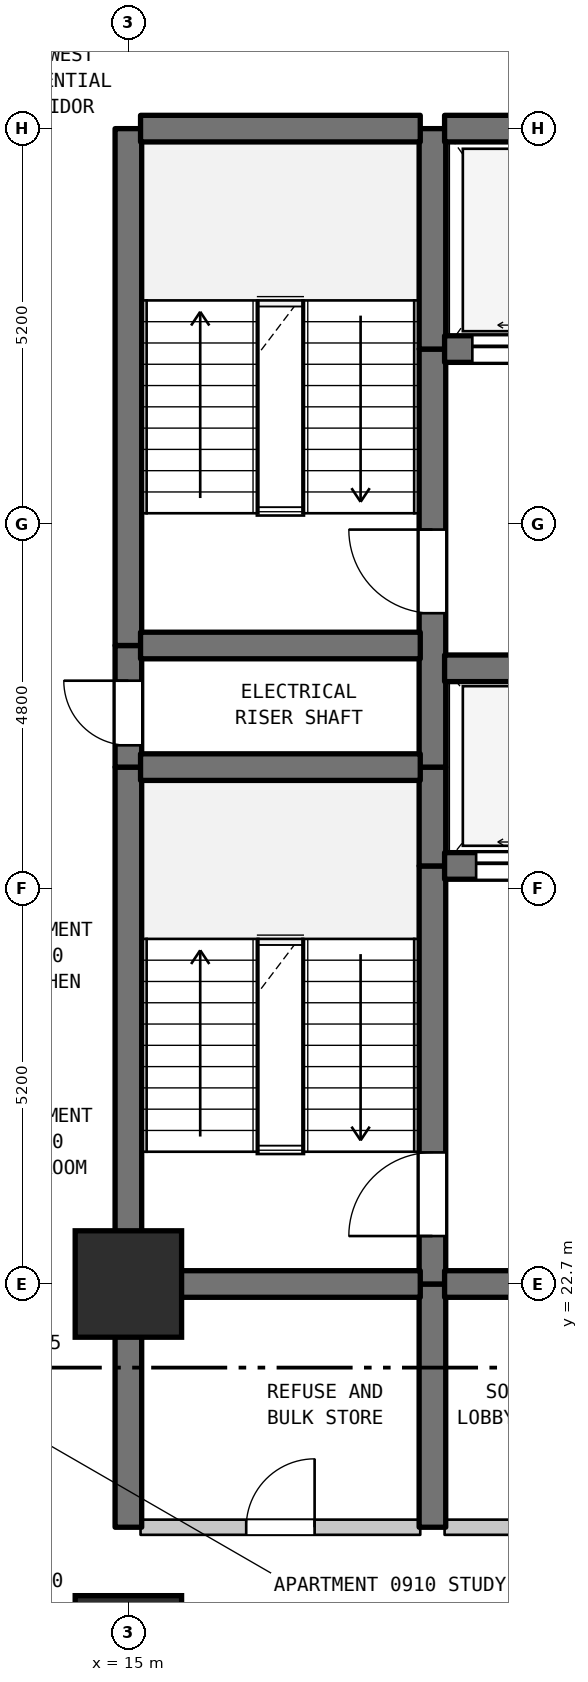
"""IFC4 building model, lengths in metres.
Left out: names, types, materials, properties, quantities, classifications, styles, units other than length and angle.
Written with IfcOpenShell. Run it as: python <this file> out.ifc"""

import sys

from ifc_helpers import new_model, si_unit, direction, frame, frame_2d, origin, origin_2d, place, context, subcontext, project, spatial, rectangle, extrude, element, fill, save


model = new_model("IFC4")
c1 = context("Model", 3, precision=1e-05, world=origin(), true_north=direction((0.0, 1.0)))
c2 = subcontext(c1, "Body", "Model", "MODEL_VIEW")
j1 = project(units=[si_unit("LENGTHUNIT", "METRE"), si_unit("PLANEANGLEUNIT", "RADIAN")], contexts=[c1])
p1 = place(None, origin())
s1 = spatial("IfcSite", under=j1, at=p1, CompositionType="ELEMENT")
p2 = place(p1, origin())
s2 = spatial("IfcBuilding", under=s1, at=p2, CompositionType="ELEMENT")
p3 = place(p2, frame((0.0, 0.0, 42.5)))
s3 = spatial("IfcBuildingStorey", under=s2, at=p3, CompositionType="ELEMENT", Elevation=42.5)
for number, where, z_axis, x_axis in (
    (1, (15.0, 17.9, 0.0), (0.0, 0.0, 1.0), (1.0, 0.0, 0.0)),
    (2, (15.0, 22.7, 0.0), (0.0, 0.0, 1.0), (1.0, 0.0, 0.0)),
):
    element("IfcColumn", number, at=place(p3, frame(where, z_axis=z_axis, x_axis=x_axis)), inside=s3, PredefinedType="COLUMN", context=c2, shape_type="SweptSolid", body=[
        extrude(rectangle(XDim=1.4, YDim=1.4, at=origin_2d()), origin(), (0.0, 0.0, 1.0), 3.7),
    ])
p4 = place(p3, frame((15.0, 19.5, 0.0), z_axis=(0.0, 0.0, 1.0), x_axis=(0.0, 1.0, 0.0)))
e3 = element("IfcWall", 3, at=p4, inside=s3, PredefinedType="SHEAR", context=c2, shape_type="SweptSolid", body=[
    extrude(rectangle(XDim=3.2, YDim=0.35, at=frame_2d((1.6, 0.0))), origin(), (0.0, 0.0, 1.0), 3.385),
])
p5 = place(p3, frame((15.0, 22.7, 0.0), z_axis=(0.0, 0.0, 1.0), x_axis=(0.0, 1.0, 0.0)))
e4 = element("IfcWall", 4, at=p5, inside=s3, PredefinedType="SHEAR", context=c2, shape_type="SweptSolid", body=[
    extrude(rectangle(XDim=6.8, YDim=0.35, at=frame_2d((3.4, 0.0))), origin(), (0.0, 0.0, 1.0), 3.385),
])
p6 = place(p3, frame((15.0, 29.5, 0.0), z_axis=(0.0, 0.0, 1.0), x_axis=(0.0, 1.0, 0.0)))
e5 = element("IfcWall", 5, at=p6, inside=s3, PredefinedType="SHEAR", context=c2, shape_type="SweptSolid", body=[
    extrude(rectangle(XDim=1.6, YDim=0.35, at=frame_2d((0.8, 0.0))), origin(), (0.0, 0.0, 1.0), 3.385),
])
p7 = place(p6, frame((0.287, 0.0, 0.0)))
e6 = element("IfcOpeningElement", 6, at=p7, cuts=e5, PredefinedType="OPENING", context=c2, shape_type="SweptSolid", body=[
    extrude(rectangle(XDim=0.85, YDim=2.1, at=frame_2d((0.425, 1.05))), frame((0.0, 0.185, 0.0), z_axis=(0.0, -1.0, 0.0), x_axis=(1.0, 0.0, 0.0)), (0.0, 0.0, 1.0), 0.37),
])
p8 = place(p3, frame((15.0, 31.1, 0.0), z_axis=(0.0, 0.0, 1.0), x_axis=(0.0, 1.0, 0.0)))
e7 = element("IfcWall", 7, at=p8, inside=s3, PredefinedType="SHEAR", context=c2, shape_type="SweptSolid", body=[
    extrude(rectangle(XDim=6.8, YDim=0.35, at=frame_2d((3.4, 0.0))), origin(), (0.0, 0.0, 1.0), 3.385),
])
p9 = place(p3, frame((19.0, 19.5, 0.0), z_axis=(0.0, 0.0, 1.0), x_axis=(0.0, 1.0, 0.0)))
e8 = element("IfcWall", 8, at=p9, inside=s3, PredefinedType="SHEAR", context=c2, shape_type="SweptSolid", body=[
    extrude(rectangle(XDim=3.2, YDim=0.35, at=frame_2d((1.6, 0.0))), origin(), (0.0, 0.0, 1.0), 3.385),
])
p10 = place(p3, frame((19.0, 22.7, 0.0), z_axis=(0.0, 0.0, 1.0), x_axis=(0.0, 1.0, 0.0)))
e9 = element("IfcWall", 9, at=p10, inside=s3, PredefinedType="SHEAR", context=c2, shape_type="SweptSolid", body=[
    extrude(rectangle(XDim=5.5, YDim=0.35, at=frame_2d((2.75, 0.0))), origin(), (0.0, 0.0, 1.0), 3.385),
])
p11 = place(p10, frame((0.631, 0.0, 0.0)))
e10 = element("IfcOpeningElement", 10, at=p11, cuts=e9, PredefinedType="OPENING", context=c2, shape_type="SweptSolid", body=[
    extrude(rectangle(XDim=1.1, YDim=2.15, at=frame_2d((0.55, 1.075))), frame((0.0, 0.185, 0.0), z_axis=(0.0, -1.0, 0.0), x_axis=(1.0, 0.0, 0.0)), (0.0, 0.0, 1.0), 0.37),
])
p12 = place(p3, frame((19.0, 28.2, 0.0), z_axis=(0.0, 0.0, 1.0), x_axis=(0.0, 1.0, 0.0)))
e11 = element("IfcWall", 11, at=p12, inside=s3, PredefinedType="SHEAR", context=c2, shape_type="SweptSolid", body=[
    extrude(rectangle(XDim=1.3, YDim=0.35, at=frame_2d((0.65, 0.0))), origin(), (0.0, 0.0, 1.0), 3.385),
])
p13 = place(p3, frame((19.0, 29.5, 0.0), z_axis=(0.0, 0.0, 1.0), x_axis=(0.0, 1.0, 0.0)))
e12 = element("IfcWall", 12, at=p13, inside=s3, PredefinedType="SHEAR", context=c2, shape_type="SweptSolid", body=[
    extrude(rectangle(XDim=5.5, YDim=0.35, at=frame_2d((2.75, 0.0))), origin(), (0.0, 0.0, 1.0), 3.385),
])
p14 = place(p13, frame((2.025, 0.0, 0.0)))
e13 = element("IfcOpeningElement", 13, at=p14, cuts=e12, PredefinedType="OPENING", context=c2, shape_type="SweptSolid", body=[
    extrude(rectangle(XDim=1.1, YDim=2.15, at=frame_2d((0.55, 1.075))), frame((0.0, 0.185, 0.0), z_axis=(0.0, -1.0, 0.0), x_axis=(1.0, 0.0, 0.0)), (0.0, 0.0, 1.0), 0.37),
])
p15 = place(p3, frame((19.0, 35.0, 0.0), z_axis=(0.0, 0.0, 1.0), x_axis=(0.0, 1.0, 0.0)))
e14 = element("IfcWall", 14, at=p15, inside=s3, PredefinedType="SHEAR", context=c2, shape_type="SweptSolid", body=[
    extrude(rectangle(XDim=2.9, YDim=0.35, at=frame_2d((1.45, 0.0))), origin(), (0.0, 0.0, 1.0), 3.385),
])
p16 = place(p3, frame((15.16, 19.5, 0.0), z_axis=(0.0, 0.0, 1.0), x_axis=(1.0, 0.0, 0.0)))
e15 = element("IfcWall", 15, at=p16, inside=s3, PredefinedType="STANDARD", context=c2, shape_type="SweptSolid", body=[
    extrude(rectangle(XDim=3.68, YDim=0.2, at=frame_2d((1.84, 0.0))), origin(), (0.0, 0.0, 1.0), 3.385),
])
p17 = place(p16, frame((1.39, 0.0, 0.0)))
e16 = element("IfcOpeningElement", 16, at=p17, cuts=e15, PredefinedType="OPENING", context=c2, shape_type="SweptSolid", body=[
    extrude(rectangle(XDim=0.9, YDim=2.15, at=frame_2d((0.45, 1.075))), frame((0.0, 0.11, 0.0), z_axis=(0.0, -1.0, 0.0), x_axis=(1.0, 0.0, 0.0)), (0.0, 0.0, 1.0), 0.22),
])
p18 = place(p3, frame((19.16, 19.5, 0.0), z_axis=(0.0, 0.0, 1.0), x_axis=(1.0, 0.0, 0.0)))
e17 = element("IfcWall", 17, at=p18, inside=s3, PredefinedType="STANDARD", context=c2, shape_type="SweptSolid", body=[
    extrude(rectangle(XDim=4.48, YDim=0.2, at=frame_2d((2.24, 0.0))), origin(), (0.0, 0.0, 1.0), 3.385),
])
p19 = place(p18, frame((1.64, 0.0, 0.0)))
e18 = element("IfcOpeningElement", 18, at=p19, cuts=e17, PredefinedType="OPENING", context=c2, shape_type="SweptSolid", body=[
    extrude(rectangle(XDim=1.2, YDim=2.2, at=frame_2d((0.6, 1.1))), frame((0.0, 0.11, 0.0), z_axis=(0.0, -1.0, 0.0), x_axis=(1.0, 0.0, 0.0)), (0.0, 0.0, 1.0), 0.22),
])
p20 = place(p3, frame((15.16, 22.7, 0.0), z_axis=(0.0, 0.0, 1.0), x_axis=(1.0, 0.0, 0.0)))
e19 = element("IfcWall", 19, at=p20, inside=s3, PredefinedType="SHEAR", context=c2, shape_type="SweptSolid", body=[
    extrude(rectangle(XDim=3.68, YDim=0.35, at=frame_2d((1.84, 0.0))), origin(), (0.0, 0.0, 1.0), 3.385),
])
p21 = place(p3, frame((19.16, 22.7, 0.0), z_axis=(0.0, 0.0, 1.0), x_axis=(1.0, 0.0, 0.0)))
e20 = element("IfcWall", 20, at=p21, inside=s3, PredefinedType="SHEAR", context=c2, shape_type="SweptSolid", body=[
    extrude(rectangle(XDim=4.48, YDim=0.35, at=frame_2d((2.24, 0.0))), origin(), (0.0, 0.0, 1.0), 3.385),
])
p22 = place(p21, frame((1.64, 0.0, 0.0)))
e21 = element("IfcOpeningElement", 21, at=p22, cuts=e20, PredefinedType="OPENING", context=c2, shape_type="SweptSolid", body=[
    extrude(rectangle(XDim=1.2, YDim=2.2, at=frame_2d((0.6, 1.1))), frame((0.0, 0.185, 0.0), z_axis=(0.0, -1.0, 0.0), x_axis=(1.0, 0.0, 0.0)), (0.0, 0.0, 1.0), 0.37),
])
p23 = place(p3, frame((19.16, 28.2, 0.0), z_axis=(0.0, 0.0, 1.0), x_axis=(1.0, 0.0, 0.0)))
e22 = element("IfcWall", 22, at=p23, inside=s3, PredefinedType="SHEAR", context=c2, shape_type="SweptSolid", body=[
    extrude(rectangle(XDim=4.48, YDim=0.35, at=frame_2d((2.24, 0.0))), origin(), (0.0, 0.0, 1.0), 3.385),
])
p24 = place(p23, frame((0.415, 0.0, 0.0)))
e23 = element("IfcOpeningElement", 23, at=p24, cuts=e22, PredefinedType="OPENING", context=c2, shape_type="SweptSolid", body=[
    extrude(rectangle(XDim=1.25, YDim=2.2, at=frame_2d((0.625, 1.1))), frame((0.0, 0.185, 0.0), z_axis=(0.0, -1.0, 0.0), x_axis=(1.0, 0.0, 0.0)), (0.0, 0.0, 1.0), 0.37),
])
p25 = place(p23, frame((2.815, 0.0, 0.0)))
e24 = element("IfcOpeningElement", 24, at=p25, cuts=e22, PredefinedType="OPENING", context=c2, shape_type="SweptSolid", body=[
    extrude(rectangle(XDim=1.25, YDim=2.2, at=frame_2d((0.625, 1.1))), frame((0.0, 0.185, 0.0), z_axis=(0.0, -1.0, 0.0), x_axis=(1.0, 0.0, 0.0)), (0.0, 0.0, 1.0), 0.37),
])
p26 = place(p3, frame((15.16, 29.5, 0.0), z_axis=(0.0, 0.0, 1.0), x_axis=(1.0, 0.0, 0.0)))
e25 = element("IfcWall", 25, at=p26, inside=s3, PredefinedType="SHEAR", context=c2, shape_type="SweptSolid", body=[
    extrude(rectangle(XDim=3.68, YDim=0.35, at=frame_2d((1.84, 0.0))), origin(), (0.0, 0.0, 1.0), 3.385),
])
p27 = place(p3, frame((19.16, 30.8, 0.0), z_axis=(0.0, 0.0, 1.0), x_axis=(1.0, 0.0, 0.0)))
e26 = element("IfcWall", 26, at=p27, inside=s3, PredefinedType="SHEAR", context=c2, shape_type="SweptSolid", body=[
    extrude(rectangle(XDim=4.48, YDim=0.35, at=frame_2d((2.24, 0.0))), origin(), (0.0, 0.0, 1.0), 3.385),
])
p28 = place(p3, frame((15.16, 31.1, 0.0), z_axis=(0.0, 0.0, 1.0), x_axis=(1.0, 0.0, 0.0)))
e27 = element("IfcWall", 27, at=p28, inside=s3, PredefinedType="SHEAR", context=c2, shape_type="SweptSolid", body=[
    extrude(rectangle(XDim=3.68, YDim=0.35, at=frame_2d((1.84, 0.0))), origin(), (0.0, 0.0, 1.0), 3.385),
])
p29 = place(p3, frame((19.16, 35.0, 0.0), z_axis=(0.0, 0.0, 1.0), x_axis=(1.0, 0.0, 0.0)))
e28 = element("IfcWall", 28, at=p29, inside=s3, PredefinedType="SHEAR", context=c2, shape_type="SweptSolid", body=[
    extrude(rectangle(XDim=11.48, YDim=0.35, at=frame_2d((5.74, 0.0))), origin(), (0.0, 0.0, 1.0), 3.385),
])
p30 = place(p29, frame((0.365, 0.0, 0.0)))
e29 = element("IfcOpeningElement", 29, at=p30, cuts=e28, PredefinedType="OPENING", context=c2, shape_type="SweptSolid", body=[
    extrude(rectangle(XDim=1.35, YDim=2.2, at=frame_2d((0.675, 1.1))), frame((0.0, 0.185, 0.0), z_axis=(0.0, -1.0, 0.0), x_axis=(1.0, 0.0, 0.0)), (0.0, 0.0, 1.0), 0.37),
])
p31 = place(p29, frame((2.765, 0.0, 0.0)))
e30 = element("IfcOpeningElement", 30, at=p31, cuts=e28, PredefinedType="OPENING", context=c2, shape_type="SweptSolid", body=[
    extrude(rectangle(XDim=1.35, YDim=2.2, at=frame_2d((0.675, 1.1))), frame((0.0, 0.185, 0.0), z_axis=(0.0, -1.0, 0.0), x_axis=(1.0, 0.0, 0.0)), (0.0, 0.0, 1.0), 0.37),
])
p32 = place(p29, frame((4.915, 0.0, 0.0)))
e31 = element("IfcOpeningElement", 31, at=p32, cuts=e28, PredefinedType="OPENING", context=c2, shape_type="SweptSolid", body=[
    extrude(rectangle(XDim=1.2, YDim=2.2, at=frame_2d((0.6, 1.1))), frame((0.0, 0.185, 0.0), z_axis=(0.0, -1.0, 0.0), x_axis=(1.0, 0.0, 0.0)), (0.0, 0.0, 1.0), 0.37),
])
p33 = place(p29, frame((6.665, 0.0, 0.0)))
e32 = element("IfcOpeningElement", 32, at=p33, cuts=e28, PredefinedType="OPENING", context=c2, shape_type="SweptSolid", body=[
    extrude(rectangle(XDim=1.2, YDim=2.2, at=frame_2d((0.6, 1.1))), frame((0.0, 0.185, 0.0), z_axis=(0.0, -1.0, 0.0), x_axis=(1.0, 0.0, 0.0)), (0.0, 0.0, 1.0), 0.37),
])
p34 = place(p29, frame((8.415, 0.0, 0.0)))
e33 = element("IfcOpeningElement", 33, at=p34, cuts=e28, PredefinedType="OPENING", context=c2, shape_type="SweptSolid", body=[
    extrude(rectangle(XDim=1.2, YDim=2.2, at=frame_2d((0.6, 1.1))), frame((0.0, 0.185, 0.0), z_axis=(0.0, -1.0, 0.0), x_axis=(1.0, 0.0, 0.0)), (0.0, 0.0, 1.0), 0.37),
])
p35 = place(p29, frame((10.16, 0.0, 0.0)))
e34 = element("IfcOpeningElement", 34, at=p35, cuts=e28, PredefinedType="OPENING", context=c2, shape_type="SweptSolid", body=[
    extrude(rectangle(XDim=1.2, YDim=2.2, at=frame_2d((0.6, 1.1))), frame((0.0, 0.185, 0.0), z_axis=(0.0, -1.0, 0.0), x_axis=(1.0, 0.0, 0.0)), (0.0, 0.0, 1.0), 0.37),
])
p36 = place(p3, frame((15.16, 37.9, 0.0), z_axis=(0.0, 0.0, 1.0), x_axis=(1.0, 0.0, 0.0)))
e35 = element("IfcWall", 35, at=p36, inside=s3, PredefinedType="SHEAR", context=c2, shape_type="SweptSolid", body=[
    extrude(rectangle(XDim=3.68, YDim=0.35, at=frame_2d((1.84, 0.0))), origin(), (0.0, 0.0, 1.0), 3.385),
])
p37 = place(p3, frame((19.16, 37.9, 0.0), z_axis=(0.0, 0.0, 1.0), x_axis=(1.0, 0.0, 0.0)))
e36 = element("IfcWall", 36, at=p37, inside=s3, PredefinedType="SHEAR", context=c2, shape_type="SweptSolid", body=[
    extrude(rectangle(XDim=11.48, YDim=0.35, at=frame_2d((5.74, 0.0))), origin(), (0.0, 0.0, 1.0), 3.385),
])
p38 = place(p7, origin())
e37 = element("IfcDoor", 37, at=p38, inside=s3, OperationType="SINGLE_SWING_RIGHT", PredefinedType="DOOR", context=c2, shape_type="SweptSolid", body=[
    extrude(rectangle(XDim=0.85, YDim=2.1, at=frame_2d((0.425, 1.05))), frame((0.0, 0.025, 0.0), z_axis=(0.0, -1.0, 0.0), x_axis=(1.0, 0.0, 0.0)), (0.0, 0.0, 1.0), 0.05),
])
fill(e6, e37)
p39 = place(p11, origin())
e38 = element("IfcDoor", 38, at=p39, inside=s3, OperationType="SINGLE_SWING_LEFT", PredefinedType="DOOR", context=c2, shape_type="SweptSolid", body=[
    extrude(rectangle(XDim=1.1, YDim=2.15, at=frame_2d((0.55, 1.075))), frame((0.0, 0.025, 0.0), z_axis=(0.0, -1.0, 0.0), x_axis=(1.0, 0.0, 0.0)), (0.0, 0.0, 1.0), 0.05),
])
fill(e10, e38)
p40 = place(p14, origin())
e39 = element("IfcDoor", 39, at=p40, inside=s3, OperationType="SINGLE_SWING_RIGHT", PredefinedType="DOOR", context=c2, shape_type="SweptSolid", body=[
    extrude(rectangle(XDim=1.1, YDim=2.15, at=frame_2d((0.55, 1.075))), frame((0.0, 0.025, 0.0), z_axis=(0.0, -1.0, 0.0), x_axis=(1.0, 0.0, 0.0)), (0.0, 0.0, 1.0), 0.05),
])
fill(e13, e39)
p41 = place(p17, origin())
e40 = element("IfcDoor", 40, at=p41, inside=s3, OperationType="SINGLE_SWING_RIGHT", PredefinedType="DOOR", context=c2, shape_type="SweptSolid", body=[
    extrude(rectangle(XDim=0.9, YDim=2.15, at=frame_2d((0.45, 1.075))), frame((0.0, 0.025, 0.0), z_axis=(0.0, -1.0, 0.0), x_axis=(1.0, 0.0, 0.0)), (0.0, 0.0, 1.0), 0.05),
])
fill(e16, e40)
p42 = place(p24, origin())
e41 = element("IfcDoor", 41, at=p42, inside=s3, OperationType="DOUBLE_DOOR_SLIDING", PredefinedType="DOOR", context=c2, shape_type="SweptSolid", body=[
    extrude(rectangle(XDim=1.25, YDim=2.2, at=frame_2d((0.625, 1.1))), frame((0.0, 0.025, 0.0), z_axis=(0.0, -1.0, 0.0), x_axis=(1.0, 0.0, 0.0)), (0.0, 0.0, 1.0), 0.05),
])
fill(e23, e41)
p43 = place(p30, origin())
e42 = element("IfcDoor", 42, at=p43, inside=s3, OperationType="DOUBLE_DOOR_SLIDING", PredefinedType="DOOR", context=c2, shape_type="SweptSolid", body=[
    extrude(rectangle(XDim=1.35, YDim=2.2, at=frame_2d((0.675, 1.1))), frame((0.0, 0.025, 0.0), z_axis=(0.0, -1.0, 0.0), x_axis=(1.0, 0.0, 0.0)), (0.0, 0.0, 1.0), 0.05),
])
fill(e29, e42)
save(model, sys.argv[1])
